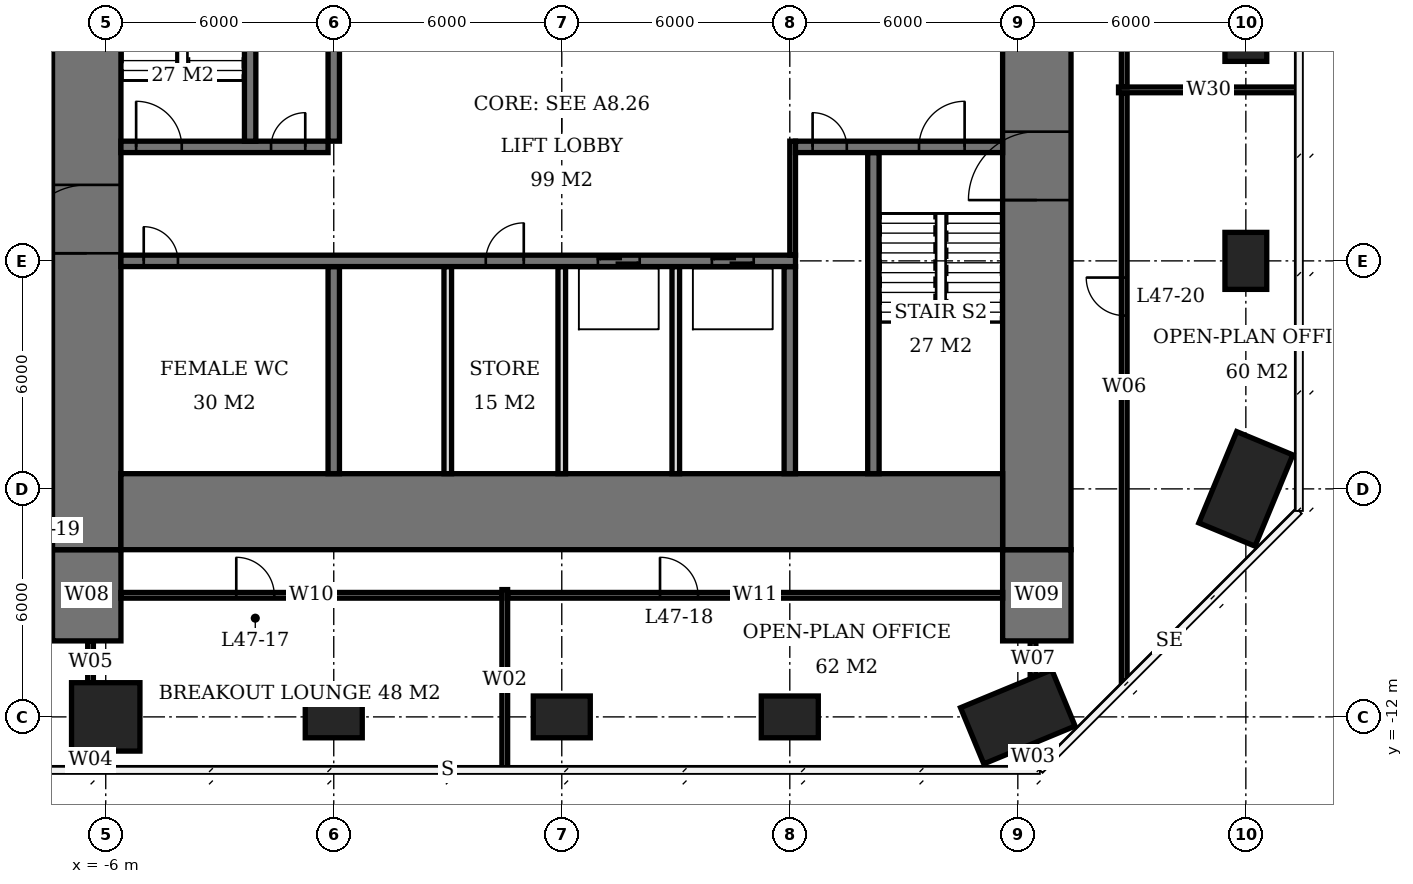
"""IFC4 building model, lengths in metres.
Left out: names, types, materials, properties, quantities, classifications, styles, units other than length and angle.
Written with IfcOpenShell. Run it as: python <this file> out.ifc"""

import sys

from ifc_helpers import new_model, si_unit, direction, frame, frame_2d, origin, origin_2d, place, context, subcontext, project, spatial, rectangle, extrude, element, fill, save


model = new_model("IFC4")
c1 = context("Model", 3, precision=1e-05, world=origin(), true_north=direction((0.0, 1.0)))
c2 = subcontext(c1, "Body", "Model", "MODEL_VIEW")
j1 = project(units=[si_unit("LENGTHUNIT", "METRE"), si_unit("PLANEANGLEUNIT", "RADIAN")], contexts=[c1])
p1 = place(None, origin())
s1 = spatial("IfcSite", under=j1, at=p1, CompositionType="ELEMENT")
p2 = place(p1, origin())
s2 = spatial("IfcBuilding", under=s1, at=p2, CompositionType="ELEMENT")
p3 = place(p2, frame((0.0, 0.0, 192.8)))
s3 = spatial("IfcBuildingStorey", under=s2, at=p3, CompositionType="ELEMENT", Elevation=192.8)
p4 = place(p3, frame((-6.0, -12.0, 0.0), z_axis=(0.0, 0.0, 1.0), x_axis=(1.0, 0.0, 0.0)))
e1 = element("IfcColumn", 1, at=p4, inside=s3, PredefinedType="COLUMN", context=c2, shape_type="SweptSolid", body=[
    extrude(rectangle(XDim=1.8, YDim=1.8, at=origin_2d()), origin(), (0.0, 0.0, 1.0), 3.9),
])
for number, where, z_axis, x_axis in (
    (2, (0.0, -12.0, 0.0), (0.0, 0.0, 1.0), (1.0, 0.0, 0.0)),
    (3, (6.0, -12.0, 0.0), (0.0, 0.0, 1.0), (1.0, 0.0, 0.0)),
    (4, (12.0, -12.0, 0.0), (0.0, 0.0, 1.0), (1.0, 0.0, 0.0)),
):
    element("IfcColumn", number, at=place(p3, frame(where, z_axis=z_axis, x_axis=x_axis)), inside=s3, PredefinedType="COLUMN", context=c2, shape_type="SweptSolid", body=[
        extrude(rectangle(XDim=1.5, YDim=1.1, at=origin_2d()), origin(), (0.0, 0.0, 1.0), 3.9),
    ])
for number, where, z_axis, x_axis in (
    (5, (18.0, -12.0, 0.0), (0.0, 0.0, 1.0), (-0.924, -0.383, 0.0)),
    (6, (24.0, -6.0, 0.0), (0.0, 0.0, 1.0), (-0.383, -0.924, 0.0)),
):
    element("IfcColumn", number, at=place(p3, frame(where, z_axis=z_axis, x_axis=x_axis)), inside=s3, PredefinedType="COLUMN", context=c2, shape_type="SweptSolid", body=[
        extrude(rectangle(XDim=2.6, YDim=1.6, at=origin_2d()), origin(), (0.0, 0.0, 1.0), 3.9),
    ])
for number, where, z_axis, x_axis in (
    (7, (24.0, 0.0, 0.0), (0.0, 0.0, 1.0), (0.0, 1.0, 0.0)),
    (8, (24.0, 6.0, 0.0), (0.0, 0.0, 1.0), (0.0, 1.0, 0.0)),
):
    element("IfcColumn", number, at=place(p3, frame(where, z_axis=z_axis, x_axis=x_axis)), inside=s3, PredefinedType="COLUMN", context=c2, shape_type="SweptSolid", body=[
        extrude(rectangle(XDim=1.5, YDim=1.1, at=origin_2d()), origin(), (0.0, 0.0, 1.0), 3.9),
    ])
p5 = place(p3, frame((-5.6, -6.6, 0.0), z_axis=(0.0, 0.0, 1.0), x_axis=(1.0, 0.0, 0.0)))
e9 = element("IfcWall", 9, at=p5, inside=s3, PredefinedType="SHEAR", context=c2, shape_type="SweptSolid", body=[
    extrude(rectangle(XDim=23.2, YDim=2.0, at=frame_2d((11.6, 0.0))), origin(), (0.0, 0.0, 1.0), 3.9),
])
p6 = place(p3, frame((-6.5, -7.6, 0.0), z_axis=(0.0, 0.0, 1.0), x_axis=(0.0, 1.0, 0.0)))
e10 = element("IfcWall", 10, at=p6, inside=s3, PredefinedType="SHEAR", context=c2, shape_type="SweptSolid", body=[
    extrude(rectangle(XDim=21.2, YDim=1.8, at=frame_2d((10.6, 0.0))), origin(), (0.0, 0.0, 1.0), 3.9),
])
p7 = place(p6, frame((7.8, 0.0, 0.0)))
e11 = element("IfcOpeningElement", 11, at=p7, cuts=e10, PredefinedType="OPENING", context=c2, shape_type="SweptSolid", body=[
    extrude(rectangle(XDim=1.8, YDim=2.4, at=frame_2d((0.9, 1.2))), frame((0.0, 0.91, 0.0), z_axis=(0.0, -1.0, 0.0), x_axis=(1.0, 0.0, 0.0)), (0.0, 0.0, 1.0), 1.82),
])
p8 = place(p3, frame((18.5, -7.6, 0.0), z_axis=(0.0, 0.0, 1.0), x_axis=(0.0, 1.0, 0.0)))
e12 = element("IfcWall", 12, at=p8, inside=s3, PredefinedType="SHEAR", context=c2, shape_type="SweptSolid", body=[
    extrude(rectangle(XDim=21.2, YDim=1.8, at=frame_2d((10.6, 0.0))), origin(), (0.0, 0.0, 1.0), 3.9),
])
p9 = place(p8, frame((9.2, 0.0, 0.0)))
e13 = element("IfcOpeningElement", 13, at=p9, cuts=e12, PredefinedType="OPENING", context=c2, shape_type="SweptSolid", body=[
    extrude(rectangle(XDim=1.8, YDim=2.4, at=frame_2d((0.9, 1.2))), frame((0.0, 0.91, 0.0), z_axis=(0.0, -1.0, 0.0), x_axis=(1.0, 0.0, 0.0)), (0.0, 0.0, 1.0), 1.82),
])
for number, where, z_axis, x_axis in (
    (14, (-6.5, -10.0, 0.0), (0.0, 0.0, 1.0), (0.0, 1.0, 0.0)),
    (15, (18.5, -10.0, 0.0), (0.0, 0.0, 1.0), (0.0, 1.0, 0.0)),
):
    element("IfcWall", number, at=place(p3, frame(where, z_axis=z_axis, x_axis=x_axis)), inside=s3, PredefinedType="SHEAR", context=c2, shape_type="SweptSolid", body=[
        extrude(rectangle(XDim=2.4, YDim=1.8, at=frame_2d((1.2, 0.0))), origin(), (0.0, 0.0, 1.0), 3.9),
    ])
p10 = place(p3, frame((-5.6, 0.0, 0.0), z_axis=(0.0, 0.0, 1.0), x_axis=(1.0, 0.0, 0.0)))
e16 = element("IfcWall", 16, at=p10, inside=s3, PredefinedType="SHEAR", context=c2, shape_type="SweptSolid", body=[
    extrude(rectangle(XDim=17.75, YDim=0.3, at=frame_2d((8.875, 0.0))), origin(), (0.0, 0.0, 1.0), 3.9),
])
p11 = place(p10, frame((0.6, 0.0, 0.0)))
e17 = element("IfcOpeningElement", 17, at=p11, cuts=e16, PredefinedType="OPENING", context=c2, shape_type="SweptSolid", body=[
    extrude(rectangle(XDim=0.9, YDim=2.1, at=frame_2d((0.45, 1.05))), frame((0.0, 0.16, 0.0), z_axis=(0.0, -1.0, 0.0), x_axis=(1.0, 0.0, 0.0)), (0.0, 0.0, 1.0), 0.32),
])
p12 = place(p10, frame((9.6, 0.0, 0.0)))
e18 = element("IfcOpeningElement", 18, at=p12, cuts=e16, PredefinedType="OPENING", context=c2, shape_type="SweptSolid", body=[
    extrude(rectangle(XDim=1.0, YDim=2.1, at=frame_2d((0.5, 1.05))), frame((0.0, 0.16, 0.0), z_axis=(0.0, -1.0, 0.0), x_axis=(1.0, 0.0, 0.0)), (0.0, 0.0, 1.0), 0.32),
])
p13 = place(p10, frame((12.55, 0.0, 0.0)))
e19 = element("IfcOpeningElement", 19, at=p13, cuts=e16, PredefinedType="OPENING", context=c2, shape_type="SweptSolid", body=[
    extrude(rectangle(XDim=1.1, YDim=2.1, at=frame_2d((0.55, 1.05))), frame((0.0, 0.16, 0.0), z_axis=(0.0, -1.0, 0.0), x_axis=(1.0, 0.0, 0.0)), (0.0, 0.0, 1.0), 0.32),
])
p14 = place(p10, frame((15.55, 0.0, 0.0)))
e20 = element("IfcOpeningElement", 20, at=p14, cuts=e16, PredefinedType="OPENING", context=c2, shape_type="SweptSolid", body=[
    extrude(rectangle(XDim=1.1, YDim=2.1, at=frame_2d((0.55, 1.05))), frame((0.0, 0.16, 0.0), z_axis=(0.0, -1.0, 0.0), x_axis=(1.0, 0.0, 0.0)), (0.0, 0.0, 1.0), 0.32),
])
p15 = place(p3, frame((-5.6, 3.0, 0.0), z_axis=(0.0, 0.0, 1.0), x_axis=(1.0, 0.0, 0.0)))
e21 = element("IfcWall", 21, at=p15, inside=s3, PredefinedType="SHEAR", context=c2, shape_type="SweptSolid", body=[
    extrude(rectangle(XDim=5.45, YDim=0.3, at=frame_2d((2.725, 0.0))), origin(), (0.0, 0.0, 1.0), 3.9),
])
p16 = place(p15, frame((0.4, 0.0, 0.0)))
e22 = element("IfcOpeningElement", 22, at=p16, cuts=e21, PredefinedType="OPENING", context=c2, shape_type="SweptSolid", body=[
    extrude(rectangle(XDim=1.2, YDim=2.1, at=frame_2d((0.6, 1.05))), frame((0.0, 0.16, 0.0), z_axis=(0.0, -1.0, 0.0), x_axis=(1.0, 0.0, 0.0)), (0.0, 0.0, 1.0), 0.32),
])
p17 = place(p15, frame((3.95, 0.0, 0.0)))
e23 = element("IfcOpeningElement", 23, at=p17, cuts=e21, PredefinedType="OPENING", context=c2, shape_type="SweptSolid", body=[
    extrude(rectangle(XDim=0.9, YDim=2.1, at=frame_2d((0.45, 1.05))), frame((0.0, 0.16, 0.0), z_axis=(0.0, -1.0, 0.0), x_axis=(1.0, 0.0, 0.0)), (0.0, 0.0, 1.0), 0.32),
])
p18 = place(p3, frame((12.15, 3.0, 0.0), z_axis=(0.0, 0.0, 1.0), x_axis=(1.0, 0.0, 0.0)))
e24 = element("IfcWall", 24, at=p18, inside=s3, PredefinedType="SHEAR", context=c2, shape_type="SweptSolid", body=[
    extrude(rectangle(XDim=5.45, YDim=0.3, at=frame_2d((2.725, 0.0))), origin(), (0.0, 0.0, 1.0), 3.9),
])
p19 = place(p18, frame((3.25, 0.0, 0.0)))
e25 = element("IfcOpeningElement", 25, at=p19, cuts=e24, PredefinedType="OPENING", context=c2, shape_type="SweptSolid", body=[
    extrude(rectangle(XDim=1.2, YDim=2.1, at=frame_2d((0.6, 1.05))), frame((0.0, 0.16, 0.0), z_axis=(0.0, -1.0, 0.0), x_axis=(1.0, 0.0, 0.0)), (0.0, 0.0, 1.0), 0.32),
])
p20 = place(p18, frame((0.45, 0.0, 0.0)))
e26 = element("IfcOpeningElement", 26, at=p20, cuts=e24, PredefinedType="OPENING", context=c2, shape_type="SweptSolid", body=[
    extrude(rectangle(XDim=0.9, YDim=2.1, at=frame_2d((0.45, 1.05))), frame((0.0, 0.16, 0.0), z_axis=(0.0, -1.0, 0.0), x_axis=(1.0, 0.0, 0.0)), (0.0, 0.0, 1.0), 0.32),
])
p21 = place(p3, frame((0.0, -5.6, 0.0), z_axis=(0.0, 0.0, 1.0), x_axis=(0.0, 1.0, 0.0)))
e27 = element("IfcWall", 27, at=p21, inside=s3, PredefinedType="SHEAR", context=c2, shape_type="SweptSolid", body=[
    extrude(rectangle(XDim=5.45, YDim=0.3, at=frame_2d((2.725, 0.0))), origin(), (0.0, 0.0, 1.0), 3.9),
])
p22 = place(p3, frame((0.0, 3.15, 0.0), z_axis=(0.0, 0.0, 1.0), x_axis=(0.0, 1.0, 0.0)))
e28 = element("IfcWall", 28, at=p22, inside=s3, PredefinedType="SHEAR", context=c2, shape_type="SweptSolid", body=[
    extrude(rectangle(XDim=8.45, YDim=0.3, at=frame_2d((4.225, 0.0))), origin(), (0.0, 0.0, 1.0), 3.9),
])
p23 = place(p3, frame((12.0, -5.6, 0.0), z_axis=(0.0, 0.0, 1.0), x_axis=(0.0, 1.0, 0.0)))
e29 = element("IfcWall", 29, at=p23, inside=s3, PredefinedType="SHEAR", context=c2, shape_type="SweptSolid", body=[
    extrude(rectangle(XDim=5.45, YDim=0.3, at=frame_2d((2.725, 0.0))), origin(), (0.0, 0.0, 1.0), 3.9),
])
for number, where, z_axis, x_axis in (
    (30, (-2.2, 3.15, 0.0), (0.0, 0.0, 1.0), (0.0, 1.0, 0.0)),
    (31, (14.2, -5.6, 0.0), (0.0, 0.0, 1.0), (0.0, 1.0, 0.0)),
):
    element("IfcWall", number, at=place(p3, frame(where, z_axis=z_axis, x_axis=x_axis)), inside=s3, PredefinedType="SHEAR", context=c2, shape_type="SweptSolid", body=[
        extrude(rectangle(XDim=8.45, YDim=0.3, at=frame_2d((4.225, 0.0))), origin(), (0.0, 0.0, 1.0), 3.9),
    ])
for number, where, z_axis, x_axis in (
    (32, (3.0, -5.6, 0.0), (0.0, 0.0, 1.0), (0.0, 1.0, 0.0)),
    (33, (6.0, -5.6, 0.0), (0.0, 0.0, 1.0), (0.0, 1.0, 0.0)),
    (34, (9.0, -5.6, 0.0), (0.0, 0.0, 1.0), (0.0, 1.0, 0.0)),
):
    element("IfcWall", number, at=place(p3, frame(where, z_axis=z_axis, x_axis=x_axis)), inside=s3, PredefinedType="SOLIDWALL", context=c2, shape_type="SweptSolid", body=[
        extrude(rectangle(XDim=5.45, YDim=0.2, at=frame_2d((2.725, 0.0))), origin(), (0.0, 0.0, 1.0), 3.9),
    ])
p24 = place(p3, frame((-6.4, -13.35, 0.0), z_axis=(0.0, 0.0, 1.0), x_axis=(0.0, 1.0, 0.0)))
e35 = element("IfcWall", 35, at=p24, inside=s3, PredefinedType="PARTITIONING", context=c2, shape_type="SweptSolid", body=[
    extrude(rectangle(XDim=0.45, YDim=0.15, at=frame_2d((0.225, 0.0))), origin(), (0.0, 0.0, 1.0), 3.65),
])
p25 = place(p3, frame((-6.4, -11.1, 0.0), z_axis=(0.0, 0.0, 1.0), x_axis=(0.0, 1.0, 0.0)))
e36 = element("IfcWall", 36, at=p25, inside=s3, PredefinedType="PARTITIONING", context=c2, shape_type="SweptSolid", body=[
    extrude(rectangle(XDim=1.1, YDim=0.15, at=frame_2d((0.55, 0.0))), origin(), (0.0, 0.0, 1.0), 3.65),
])
p26 = place(p3, frame((-5.6, -8.8, 0.0), z_axis=(0.0, 0.0, 1.0), x_axis=(1.0, 0.0, 0.0)))
e37 = element("IfcWall", 37, at=p26, inside=s3, PredefinedType="PARTITIONING", context=c2, shape_type="SweptSolid", body=[
    extrude(rectangle(XDim=10.025, YDim=0.15, at=frame_2d((5.013, 0.0))), origin(), (0.0, 0.0, 1.0), 3.65),
])
p27 = place(p26, frame((3.035, 0.0, 0.0)))
e38 = element("IfcOpeningElement", 38, at=p27, cuts=e37, PredefinedType="OPENING", context=c2, shape_type="SweptSolid", body=[
    extrude(rectangle(XDim=1.0, YDim=2.1, at=frame_2d((0.5, 1.05))), frame((0.0, 0.085, 0.0), z_axis=(0.0, -1.0, 0.0), x_axis=(1.0, 0.0, 0.0)), (0.0, 0.0, 1.0), 0.17),
])
p28 = place(p3, frame((4.5, -13.4, 0.0), z_axis=(0.0, 0.0, 1.0), x_axis=(0.0, 1.0, 0.0)))
e39 = element("IfcWall", 39, at=p28, inside=s3, PredefinedType="PARTITIONING", context=c2, shape_type="SweptSolid", body=[
    extrude(rectangle(XDim=4.75, YDim=0.15, at=frame_2d((2.375, 0.0))), origin(), (0.0, 0.0, 1.0), 3.65),
])
p29 = place(p3, frame((4.575, -8.8, 0.0), z_axis=(0.0, 0.0, 1.0), x_axis=(1.0, 0.0, 0.0)))
e40 = element("IfcWall", 40, at=p29, inside=s3, PredefinedType="PARTITIONING", context=c2, shape_type="SweptSolid", body=[
    extrude(rectangle(XDim=13.025, YDim=0.15, at=frame_2d((6.513, 0.0))), origin(), (0.0, 0.0, 1.0), 3.65),
])
p30 = place(p29, frame((4.01, 0.0, 0.0)))
e41 = element("IfcOpeningElement", 41, at=p30, cuts=e40, PredefinedType="OPENING", context=c2, shape_type="SweptSolid", body=[
    extrude(rectangle(XDim=1.0, YDim=2.1, at=frame_2d((0.5, 1.05))), frame((0.0, 0.085, 0.0), z_axis=(0.0, -1.0, 0.0), x_axis=(1.0, 0.0, 0.0)), (0.0, 0.0, 1.0), 0.17),
])
p31 = place(p3, frame((18.4, -13.4, 0.0), z_axis=(0.0, 0.0, 1.0), x_axis=(0.0, 1.0, 0.0)))
e42 = element("IfcWall", 42, at=p31, inside=s3, PredefinedType="PARTITIONING", context=c2, shape_type="SweptSolid", body=[
    extrude(rectangle(XDim=0.669, YDim=0.15, at=frame_2d((0.334, 0.0))), origin(), (0.0, 0.0, 1.0), 3.65),
])
p32 = place(p3, frame((18.4, -10.937, 0.0), z_axis=(0.0, 0.0, 1.0), x_axis=(0.0, 1.0, 0.0)))
e43 = element("IfcWall", 43, at=p32, inside=s3, PredefinedType="PARTITIONING", context=c2, shape_type="SweptSolid", body=[
    extrude(rectangle(XDim=0.937, YDim=0.15, at=frame_2d((0.469, 0.0))), origin(), (0.0, 0.0, 1.0), 3.65),
])
p33 = place(p3, frame((20.8, -11.064, 0.0), z_axis=(0.0, 0.0, 1.0), x_axis=(0.0, 1.0, 0.0)))
e44 = element("IfcWall", 44, at=p33, inside=s3, PredefinedType="PARTITIONING", context=c2, shape_type="SweptSolid", body=[
    extrude(rectangle(XDim=15.489, YDim=0.15, at=frame_2d((7.745, 0.0))), origin(), (0.0, 0.0, 1.0), 3.65),
])
p34 = place(p33, frame((9.625, 0.0, 0.0)))
e45 = element("IfcOpeningElement", 45, at=p34, cuts=e44, PredefinedType="OPENING", context=c2, shape_type="SweptSolid", body=[
    extrude(rectangle(XDim=1.0, YDim=2.1, at=frame_2d((0.5, 1.05))), frame((0.0, 0.085, 0.0), z_axis=(0.0, -1.0, 0.0), x_axis=(1.0, 0.0, 0.0)), (0.0, 0.0, 1.0), 0.17),
])
p35 = place(p3, frame((20.8, 4.575, 0.0), z_axis=(0.0, 0.0, 1.0), x_axis=(0.0, 1.0, 0.0)))
e46 = element("IfcWall", 46, at=p35, inside=s3, PredefinedType="PARTITIONING", context=c2, shape_type="SweptSolid", body=[
    extrude(rectangle(XDim=8.85, YDim=0.15, at=frame_2d((4.425, 0.0))), origin(), (0.0, 0.0, 1.0), 3.65),
])
p36 = place(p35, frame((5.275, 0.0, 0.0)))
e47 = element("IfcOpeningElement", 47, at=p36, cuts=e46, PredefinedType="OPENING", context=c2, shape_type="SweptSolid", body=[
    extrude(rectangle(XDim=1.0, YDim=2.1, at=frame_2d((0.5, 1.05))), frame((0.0, 0.085, 0.0), z_axis=(0.0, -1.0, 0.0), x_axis=(1.0, 0.0, 0.0)), (0.0, 0.0, 1.0), 0.17),
])
p37 = place(p3, frame((20.65, 4.5, 0.0), z_axis=(0.0, 0.0, 1.0), x_axis=(1.0, 0.0, 0.0)))
e48 = element("IfcWall", 48, at=p37, inside=s3, PredefinedType="PARTITIONING", context=c2, shape_type="SweptSolid", body=[
    extrude(rectangle(XDim=4.75, YDim=0.15, at=frame_2d((2.375, 0.0))), origin(), (0.0, 0.0, 1.0), 3.65),
])
p38 = place(p3, frame((12.075, 0.15, 0.0), z_axis=(0.0, 0.0, 1.0), x_axis=(0.0, 1.0, 0.0)))
e49 = element("IfcWall", 49, at=p38, inside=s3, PredefinedType="PARTITIONING", context=c2, shape_type="SweptSolid", body=[
    extrude(rectangle(XDim=3.0, YDim=0.15, at=frame_2d((1.5, 0.0))), origin(), (0.0, 0.0, 1.0), 3.65),
])
p39 = place(p7, origin())
e50 = element("IfcDoor", 50, at=p39, inside=s3, OperationType="DOUBLE_DOOR_SINGLE_SWING", PredefinedType="DOOR", context=c2, shape_type="SweptSolid", body=[
    extrude(rectangle(XDim=1.8, YDim=2.4, at=frame_2d((0.9, 1.2))), frame((0.0, 0.025, 0.0), z_axis=(0.0, -1.0, 0.0), x_axis=(1.0, 0.0, 0.0)), (0.0, 0.0, 1.0), 0.05),
])
fill(e11, e50)
p40 = place(p9, origin())
e51 = element("IfcDoor", 51, at=p40, inside=s3, OperationType="DOUBLE_DOOR_SINGLE_SWING", PredefinedType="DOOR", context=c2, shape_type="SweptSolid", body=[
    extrude(rectangle(XDim=1.8, YDim=2.4, at=frame_2d((0.9, 1.2))), frame((0.0, 0.025, 0.0), z_axis=(0.0, -1.0, 0.0), x_axis=(1.0, 0.0, 0.0)), (0.0, 0.0, 1.0), 0.05),
])
fill(e13, e51)
p41 = place(p16, origin())
e52 = element("IfcDoor", 52, at=p41, inside=s3, OperationType="SINGLE_SWING_LEFT", PredefinedType="DOOR", context=c2, shape_type="SweptSolid", body=[
    extrude(rectangle(XDim=1.2, YDim=2.1, at=frame_2d((0.6, 1.05))), frame((0.0, 0.025, 0.0), z_axis=(0.0, -1.0, 0.0), x_axis=(1.0, 0.0, 0.0)), (0.0, 0.0, 1.0), 0.05),
])
fill(e22, e52)
p42 = place(p17, origin())
e53 = element("IfcDoor", 53, at=p42, inside=s3, OperationType="SINGLE_SWING_RIGHT", PredefinedType="DOOR", context=c2, shape_type="SweptSolid", body=[
    extrude(rectangle(XDim=0.9, YDim=2.1, at=frame_2d((0.45, 1.05))), frame((0.0, 0.025, 0.0), z_axis=(0.0, -1.0, 0.0), x_axis=(1.0, 0.0, 0.0)), (0.0, 0.0, 1.0), 0.05),
])
fill(e23, e53)
p43 = place(p19, origin())
e54 = element("IfcDoor", 54, at=p43, inside=s3, OperationType="SINGLE_SWING_RIGHT", PredefinedType="DOOR", context=c2, shape_type="SweptSolid", body=[
    extrude(rectangle(XDim=1.2, YDim=2.1, at=frame_2d((0.6, 1.05))), frame((0.0, 0.025, 0.0), z_axis=(0.0, -1.0, 0.0), x_axis=(1.0, 0.0, 0.0)), (0.0, 0.0, 1.0), 0.05),
])
fill(e25, e54)
p44 = place(p20, origin())
e55 = element("IfcDoor", 55, at=p44, inside=s3, OperationType="SINGLE_SWING_LEFT", PredefinedType="DOOR", context=c2, shape_type="SweptSolid", body=[
    extrude(rectangle(XDim=0.9, YDim=2.1, at=frame_2d((0.45, 1.05))), frame((0.0, 0.025, 0.0), z_axis=(0.0, -1.0, 0.0), x_axis=(1.0, 0.0, 0.0)), (0.0, 0.0, 1.0), 0.05),
])
fill(e26, e55)
p45 = place(p11, origin())
e56 = element("IfcDoor", 56, at=p45, inside=s3, OperationType="SINGLE_SWING_LEFT", PredefinedType="DOOR", context=c2, shape_type="SweptSolid", body=[
    extrude(rectangle(XDim=0.9, YDim=2.1, at=frame_2d((0.45, 1.05))), frame((0.0, 0.025, 0.0), z_axis=(0.0, -1.0, 0.0), x_axis=(1.0, 0.0, 0.0)), (0.0, 0.0, 1.0), 0.05),
])
fill(e17, e56)
p46 = place(p12, origin())
e57 = element("IfcDoor", 57, at=p46, inside=s3, OperationType="SINGLE_SWING_RIGHT", PredefinedType="DOOR", context=c2, shape_type="SweptSolid", body=[
    extrude(rectangle(XDim=1.0, YDim=2.1, at=frame_2d((0.5, 1.05))), frame((0.0, 0.025, 0.0), z_axis=(0.0, -1.0, 0.0), x_axis=(1.0, 0.0, 0.0)), (0.0, 0.0, 1.0), 0.05),
])
fill(e18, e57)
p47 = place(p13, origin())
e58 = element("IfcDoor", 58, at=p47, inside=s3, OperationType="DOUBLE_DOOR_SLIDING", PredefinedType="USERDEFINED", context=c2, shape_type="SweptSolid", body=[
    extrude(rectangle(XDim=1.1, YDim=2.1, at=frame_2d((0.55, 1.05))), frame((0.0, 0.025, 0.0), z_axis=(0.0, -1.0, 0.0), x_axis=(1.0, 0.0, 0.0)), (0.0, 0.0, 1.0), 0.05),
])
fill(e19, e58)
p48 = place(p14, origin())
e59 = element("IfcDoor", 59, at=p48, inside=s3, OperationType="DOUBLE_DOOR_SLIDING", PredefinedType="USERDEFINED", context=c2, shape_type="SweptSolid", body=[
    extrude(rectangle(XDim=1.1, YDim=2.1, at=frame_2d((0.55, 1.05))), frame((0.0, 0.025, 0.0), z_axis=(0.0, -1.0, 0.0), x_axis=(1.0, 0.0, 0.0)), (0.0, 0.0, 1.0), 0.05),
])
fill(e20, e59)
p49 = place(p27, origin())
e60 = element("IfcDoor", 60, at=p49, inside=s3, OperationType="SINGLE_SWING_LEFT", PredefinedType="DOOR", context=c2, shape_type="SweptSolid", body=[
    extrude(rectangle(XDim=1.0, YDim=2.1, at=frame_2d((0.5, 1.05))), frame((0.0, 0.025, 0.0), z_axis=(0.0, -1.0, 0.0), x_axis=(1.0, 0.0, 0.0)), (0.0, 0.0, 1.0), 0.05),
])
fill(e38, e60)
p50 = place(p30, origin())
e61 = element("IfcDoor", 61, at=p50, inside=s3, OperationType="SINGLE_SWING_LEFT", PredefinedType="DOOR", context=c2, shape_type="SweptSolid", body=[
    extrude(rectangle(XDim=1.0, YDim=2.1, at=frame_2d((0.5, 1.05))), frame((0.0, 0.025, 0.0), z_axis=(0.0, -1.0, 0.0), x_axis=(1.0, 0.0, 0.0)), (0.0, 0.0, 1.0), 0.05),
])
fill(e41, e61)
p51 = place(p34, origin())
e62 = element("IfcDoor", 62, at=p51, inside=s3, OperationType="SINGLE_SWING_RIGHT", PredefinedType="DOOR", context=c2, shape_type="SweptSolid", body=[
    extrude(rectangle(XDim=1.0, YDim=2.1, at=frame_2d((0.5, 1.05))), frame((0.0, 0.025, 0.0), z_axis=(0.0, -1.0, 0.0), x_axis=(1.0, 0.0, 0.0)), (0.0, 0.0, 1.0), 0.05),
])
fill(e45, e62)
save(model, sys.argv[1])
